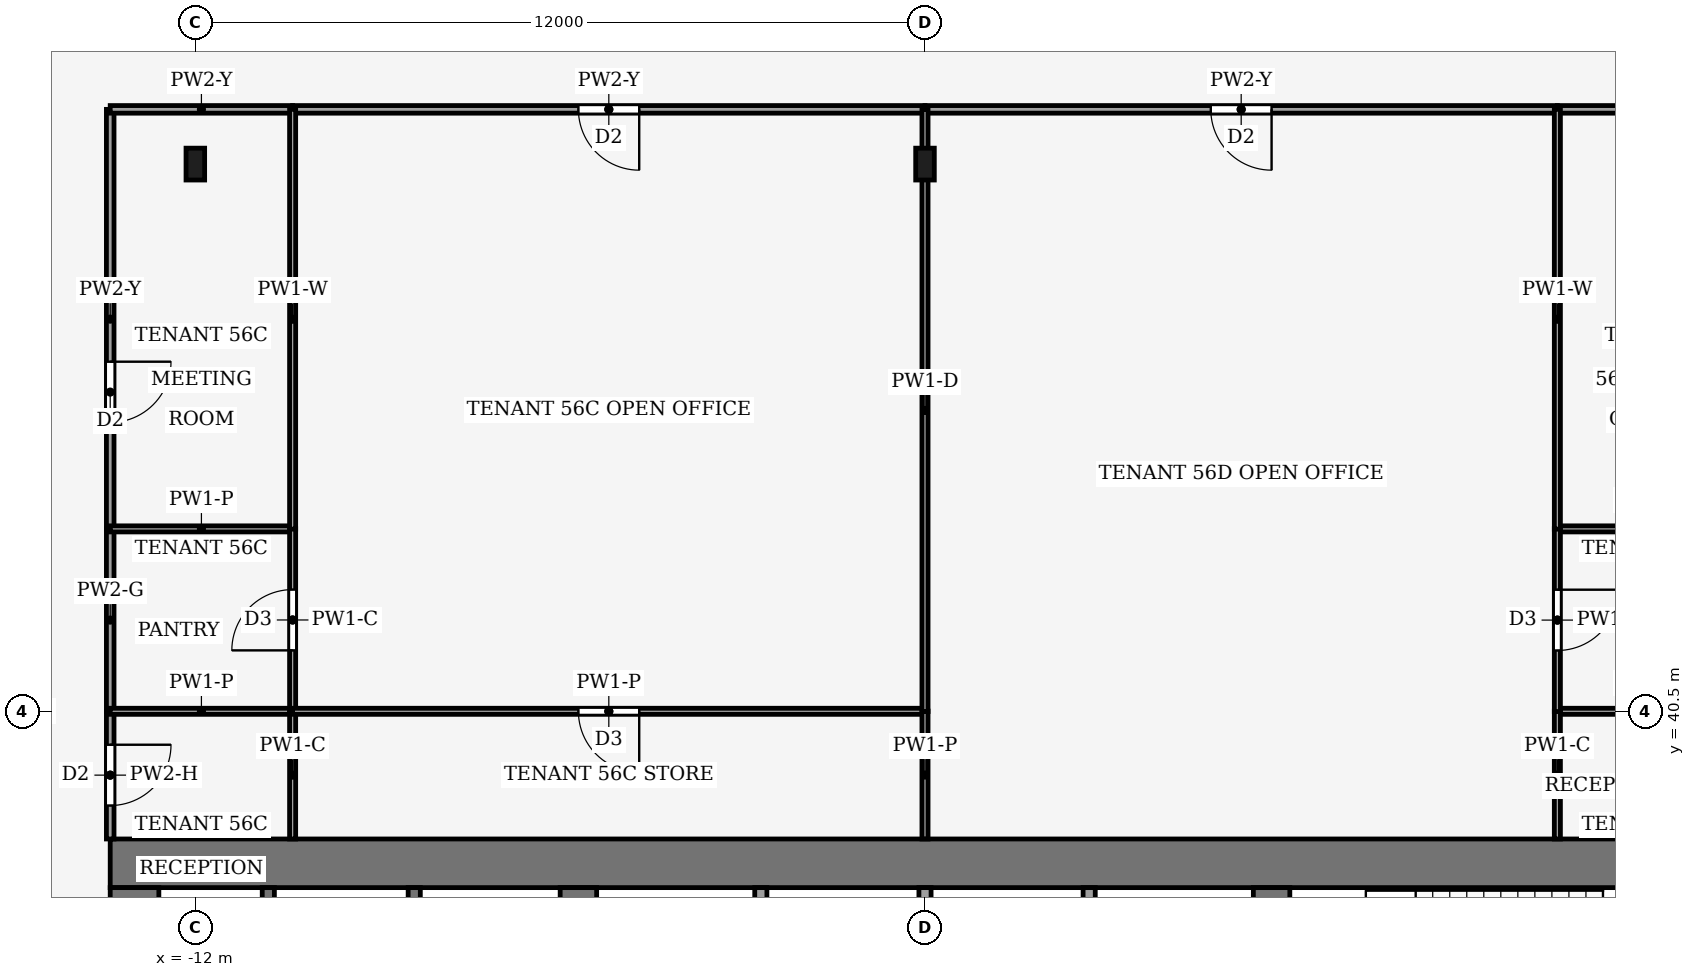
"""IFC4 building model, lengths in metres.
Left out: names, types, materials, properties, quantities, classifications, styles, units other than length and angle.
Written with IfcOpenShell. Run it as: python <this file> out.ifc"""

import sys

from ifc_helpers import new_model, si_unit, direction, frame, frame_2d, origin, origin_2d, place, context, subcontext, project, spatial, rectangle, i_section, extrude, element, fill, save


model = new_model("IFC4")
c1 = context("Model", 3, precision=1e-05, world=origin(), true_north=direction((0.0, 1.0)))
c2 = subcontext(c1, "Body", "Model", "MODEL_VIEW")
j1 = project(units=[si_unit("LENGTHUNIT", "METRE"), si_unit("PLANEANGLEUNIT", "RADIAN")], contexts=[c1])
p1 = place(None, origin())
s1 = spatial("IfcSite", under=j1, at=p1, CompositionType="ELEMENT")
p2 = place(p1, origin())
s2 = spatial("IfcBuilding", under=s1, at=p2, CompositionType="ELEMENT")
p3 = place(p2, frame((0.0, 0.0, 246.0)))
s3 = spatial("IfcBuildingStorey", under=s2, at=p3, CompositionType="ELEMENT", Elevation=246.0)
p4 = place(p3, frame((-13.4, 38.0, -0.13), z_axis=(0.0, 0.0, 1.0), x_axis=(1.0, 0.0, 0.0)))
e1 = element("IfcWall", 1, at=p4, inside=s3, PredefinedType="SHEAR", context=c2, shape_type="SweptSolid", body=[
    extrude(rectangle(XDim=26.8, YDim=0.8, at=frame_2d((13.4, 0.0))), origin(), (0.0, 0.0, 1.0), 4.0),
])
p5 = place(p3, frame((-13.0, 18.4, -0.13), z_axis=(0.0, 0.0, 1.0), x_axis=(0.0, 1.0, 0.0)))
e2 = element("IfcWall", 2, at=p5, inside=s3, PredefinedType="SHEAR", context=c2, shape_type="SweptSolid", body=[
    extrude(rectangle(XDim=19.2, YDim=0.8, at=frame_2d((9.6, 0.0))), origin(), (0.0, 0.0, 1.0), 4.0),
])
p6 = place(p5, frame((2.8, 0.0, 0.13)))
e3 = element("IfcOpeningElement", 3, at=p6, cuts=e2, PredefinedType="OPENING", context=c2, shape_type="SweptSolid", body=[
    extrude(rectangle(XDim=2.4, YDim=2.4, at=frame_2d((1.2, 1.2))), frame((0.0, 0.41, 0.0), z_axis=(0.0, -1.0, 0.0), x_axis=(1.0, 0.0, 0.0)), (0.0, 0.0, 1.0), 0.82),
])
p7 = place(p5, frame((13.4, 0.0, 0.13)))
e4 = element("IfcOpeningElement", 4, at=p7, cuts=e2, PredefinedType="OPENING", context=c2, shape_type="SweptSolid", body=[
    extrude(rectangle(XDim=1.4, YDim=2.2, at=frame_2d((0.7, 1.1))), frame((0.0, 0.41, 0.0), z_axis=(0.0, -1.0, 0.0), x_axis=(1.0, 0.0, 0.0)), (0.0, 0.0, 1.0), 0.82),
])
p8 = place(p3, frame((-5.7, 18.4, -0.13), z_axis=(0.0, 0.0, 1.0), x_axis=(0.0, 1.0, 0.0)))
e5 = element("IfcWall", 5, at=p8, inside=s3, PredefinedType="SHEAR", context=c2, shape_type="SweptSolid", body=[
    extrude(rectangle(XDim=19.2, YDim=0.6, at=frame_2d((9.6, 0.0))), origin(), (0.0, 0.0, 1.0), 4.0),
])
p9 = place(p8, frame((8.35, 0.0, 0.13)))
e6 = element("IfcOpeningElement", 6, at=p9, cuts=e5, PredefinedType="OPENING", context=c2, shape_type="SweptSolid", body=[
    extrude(rectangle(XDim=0.9, YDim=2.1, at=frame_2d((0.45, 1.05))), frame((0.0, 0.31, 0.0), z_axis=(0.0, -1.0, 0.0), x_axis=(1.0, 0.0, 0.0)), (0.0, 0.0, 1.0), 0.62),
])
p10 = place(p3, frame((5.7, 18.4, -0.13), z_axis=(0.0, 0.0, 1.0), x_axis=(0.0, 1.0, 0.0)))
e7 = element("IfcWall", 7, at=p10, inside=s3, PredefinedType="SHEAR", context=c2, shape_type="SweptSolid", body=[
    extrude(rectangle(XDim=19.2, YDim=0.6, at=frame_2d((9.6, 0.0))), origin(), (0.0, 0.0, 1.0), 4.0),
])
p11 = place(p10, frame((8.35, 0.0, 0.13)))
e8 = element("IfcOpeningElement", 8, at=p11, cuts=e7, PredefinedType="OPENING", context=c2, shape_type="SweptSolid", body=[
    extrude(rectangle(XDim=0.9, YDim=2.1, at=frame_2d((0.45, 1.05))), frame((0.0, 0.31, 0.0), z_axis=(0.0, -1.0, 0.0), x_axis=(1.0, 0.0, 0.0)), (0.0, 0.0, 1.0), 0.62),
])
p12 = place(p10, frame((13.3, 0.0, 0.13)))
e9 = element("IfcOpeningElement", 9, at=p12, cuts=e7, PredefinedType="OPENING", context=c2, shape_type="SweptSolid", body=[
    extrude(rectangle(XDim=2.4, YDim=2.4, at=frame_2d((1.2, 1.2))), frame((0.0, 0.31, 0.0), z_axis=(0.0, -1.0, 0.0), x_axis=(1.0, 0.0, 0.0)), (0.0, 0.0, 1.0), 0.62),
])
for number, where, z_axis, x_axis in (
    (10, (-12.0, 49.5, 0.0), (0.0, 0.0, 1.0), (1.0, 0.0, 0.0)),
    (11, (0.0, 49.5, 0.0), (0.0, 0.0, 1.0), (1.0, 0.0, 0.0)),
):
    element("IfcColumn", number, at=place(p3, frame(where, z_axis=z_axis, x_axis=x_axis)), inside=s3, PredefinedType="COLUMN", context=c2, shape_type="SweptSolid", body=[
        extrude(i_section(OverallWidth=0.306, OverallDepth=0.524, WebThickness=0.012, FlangeThickness=0.04, FilletRadius=0.027, at=origin_2d()), origin(), (0.0, 0.0, 1.0), 4.0),
    ])
for number, where, z_axis, x_axis in (
    (12, (-10.8, 34.0, 0.0), (0.0, 0.0, 1.0), (0.0, 1.0, 0.0)),
    (13, (-8.4, 34.0, 0.0), (0.0, 0.0, 1.0), (0.0, 1.0, 0.0)),
    (14, (-2.7, 34.0, 0.0), (0.0, 0.0, 1.0), (0.0, 1.0, 0.0)),
    (15, (0.0, 34.0, 0.0), (0.0, 0.0, 1.0), (0.0, 1.0, 0.0)),
    (16, (2.7, 34.0, 0.0), (0.0, 0.0, 1.0), (0.0, 1.0, 0.0)),
):
    element("IfcWall", number, at=place(p3, frame(where, z_axis=z_axis, x_axis=x_axis)), inside=s3, PredefinedType="PARTITIONING", context=c2, shape_type="SweptSolid", body=[
        extrude(rectangle(XDim=3.6, YDim=0.2, at=frame_2d((1.8, 0.0))), origin(), (0.0, 0.0, 1.0), 3.87),
    ])
p13 = place(p3, frame((-13.4, 40.5, 0.0), z_axis=(0.0, 0.0, 1.0), x_axis=(0.0, -1.0, 0.0)))
e17 = element("IfcWall", 17, at=p13, inside=s3, PredefinedType="PARTITIONING", context=c2, shape_type="SweptSolid", body=[
    extrude(rectangle(XDim=2.1, YDim=0.125, at=frame_2d((1.05, 0.0))), origin(), (0.0, 0.0, 1.0), 3.14),
])
p14 = place(p13, frame((0.55, 0.0, 0.0)))
e18 = element("IfcOpeningElement", 18, at=p14, cuts=e17, PredefinedType="OPENING", context=c2, shape_type="SweptSolid", body=[
    extrude(rectangle(XDim=1.0, YDim=2.1, at=frame_2d((0.5, 1.05))), frame((0.0, 0.073, 0.0), z_axis=(0.0, -1.0, 0.0), x_axis=(1.0, 0.0, 0.0)), (0.0, 0.0, 1.0), 0.145),
])
p15 = place(p3, frame((-13.4, 40.5, 0.0), z_axis=(0.0, 0.0, 1.0), x_axis=(0.0, 1.0, 0.0)))
e19 = element("IfcWall", 19, at=p15, inside=s3, PredefinedType="PARTITIONING", context=c2, shape_type="SweptSolid", body=[
    extrude(rectangle(XDim=3.0, YDim=0.125, at=frame_2d((1.5, 0.0))), origin(), (0.0, 0.0, 1.0), 3.87),
])
p16 = place(p3, frame((-13.4, 50.4, 0.0), z_axis=(0.0, 0.0, 1.0), x_axis=(0.0, -1.0, 0.0)))
e20 = element("IfcWall", 20, at=p16, inside=s3, PredefinedType="PARTITIONING", context=c2, shape_type="SweptSolid", body=[
    extrude(rectangle(XDim=6.9, YDim=0.125, at=frame_2d((3.45, 0.0))), origin(), (0.0, 0.0, 1.0), 3.24),
])
p17 = place(p16, frame((4.15, 0.0, 0.0)))
e21 = element("IfcOpeningElement", 21, at=p17, cuts=e20, PredefinedType="OPENING", context=c2, shape_type="SweptSolid", body=[
    extrude(rectangle(XDim=1.0, YDim=2.1, at=frame_2d((0.5, 1.05))), frame((0.0, 0.073, 0.0), z_axis=(0.0, -1.0, 0.0), x_axis=(1.0, 0.0, 0.0)), (0.0, 0.0, 1.0), 0.145),
])
p18 = place(p3, frame((-10.4, 50.4, 0.0), z_axis=(0.0, 0.0, 1.0), x_axis=(-1.0, 0.0, 0.0)))
e22 = element("IfcWall", 22, at=p18, inside=s3, PredefinedType="PARTITIONING", context=c2, shape_type="SweptSolid", body=[
    extrude(rectangle(XDim=3.0, YDim=0.125, at=frame_2d((1.5, 0.0))), origin(), (0.0, 0.0, 1.0), 3.24),
])
p19 = place(p3, frame((0.0, 50.4, 0.0), z_axis=(0.0, 0.0, 1.0), x_axis=(-1.0, 0.0, 0.0)))
e23 = element("IfcWall", 23, at=p19, inside=s3, PredefinedType="PARTITIONING", context=c2, shape_type="SweptSolid", body=[
    extrude(rectangle(XDim=10.4, YDim=0.125, at=frame_2d((5.2, 0.0))), origin(), (0.0, 0.0, 1.0), 3.24),
])
p20 = place(p19, frame((4.7, 0.0, 0.0)))
e24 = element("IfcOpeningElement", 24, at=p20, cuts=e23, PredefinedType="OPENING", context=c2, shape_type="SweptSolid", body=[
    extrude(rectangle(XDim=1.0, YDim=2.1, at=frame_2d((0.5, 1.05))), frame((0.0, 0.073, 0.0), z_axis=(0.0, -1.0, 0.0), x_axis=(1.0, 0.0, 0.0)), (0.0, 0.0, 1.0), 0.145),
])
p21 = place(p3, frame((13.4, 50.4, 0.0), z_axis=(0.0, 0.0, 1.0), x_axis=(-1.0, 0.0, 0.0)))
e25 = element("IfcWall", 25, at=p21, inside=s3, PredefinedType="PARTITIONING", context=c2, shape_type="SweptSolid", body=[
    extrude(rectangle(XDim=3.0, YDim=0.125, at=frame_2d((1.5, 0.0))), origin(), (0.0, 0.0, 1.0), 3.24),
])
p22 = place(p3, frame((10.4, 50.4, 0.0), z_axis=(0.0, 0.0, 1.0), x_axis=(-1.0, 0.0, 0.0)))
e26 = element("IfcWall", 26, at=p22, inside=s3, PredefinedType="PARTITIONING", context=c2, shape_type="SweptSolid", body=[
    extrude(rectangle(XDim=10.4, YDim=0.125, at=frame_2d((5.2, 0.0))), origin(), (0.0, 0.0, 1.0), 3.24),
])
p23 = place(p22, frame((4.7, 0.0, 0.0)))
e27 = element("IfcOpeningElement", 27, at=p23, cuts=e26, PredefinedType="OPENING", context=c2, shape_type="SweptSolid", body=[
    extrude(rectangle(XDim=1.0, YDim=2.1, at=frame_2d((0.5, 1.05))), frame((0.0, 0.073, 0.0), z_axis=(0.0, -1.0, 0.0), x_axis=(1.0, 0.0, 0.0)), (0.0, 0.0, 1.0), 0.145),
])
p24 = place(p3, frame((-10.4, 40.5, 0.0), z_axis=(0.0, 0.0, 1.0), x_axis=(-1.0, 0.0, 0.0)))
e28 = element("IfcWall", 28, at=p24, inside=s3, PredefinedType="PARTITIONING", context=c2, shape_type="SweptSolid", body=[
    extrude(rectangle(XDim=3.0, YDim=0.1, at=frame_2d((1.5, 0.0))), origin(), (0.0, 0.0, 1.0), 3.44),
])
p25 = place(p3, frame((-10.4, 38.4, 0.0), z_axis=(0.0, 0.0, 1.0), x_axis=(0.0, 1.0, 0.0)))
e29 = element("IfcWall", 29, at=p25, inside=s3, PredefinedType="PARTITIONING", context=c2, shape_type="SweptSolid", body=[
    extrude(rectangle(XDim=2.1, YDim=0.1, at=frame_2d((1.05, 0.0))), origin(), (0.0, 0.0, 1.0), 3.87),
])
p26 = place(p3, frame((-10.4, 43.5, 0.0), z_axis=(0.0, 0.0, 1.0), x_axis=(-1.0, 0.0, 0.0)))
e30 = element("IfcWall", 30, at=p26, inside=s3, PredefinedType="PARTITIONING", context=c2, shape_type="SweptSolid", body=[
    extrude(rectangle(XDim=3.0, YDim=0.1, at=frame_2d((1.5, 0.0))), origin(), (0.0, 0.0, 1.0), 3.44),
])
p27 = place(p3, frame((-10.4, 40.5, 0.0), z_axis=(0.0, 0.0, 1.0), x_axis=(0.0, 1.0, 0.0)))
e31 = element("IfcWall", 31, at=p27, inside=s3, PredefinedType="PARTITIONING", context=c2, shape_type="SweptSolid", body=[
    extrude(rectangle(XDim=3.004, YDim=0.1, at=frame_2d((1.502, 0.0))), origin(), (0.0, 0.0, 1.0), 3.87),
])
p28 = place(p27, frame((1.002, 0.0, 0.0)))
e32 = element("IfcOpeningElement", 32, at=p28, cuts=e31, PredefinedType="OPENING", context=c2, shape_type="SweptSolid", body=[
    extrude(rectangle(XDim=1.0, YDim=2.1, at=frame_2d((0.5, 1.05))), frame((0.0, 0.06, 0.0), z_axis=(0.0, -1.0, 0.0), x_axis=(1.0, 0.0, 0.0)), (0.0, 0.0, 1.0), 0.12),
])
p29 = place(p3, frame((-10.4, 43.496, 0.0), z_axis=(0.0, 0.0, 1.0), x_axis=(0.0, 1.0, 0.0)))
e33 = element("IfcWall", 33, at=p29, inside=s3, PredefinedType="PARTITIONING", context=c2, shape_type="SweptSolid", body=[
    extrude(rectangle(XDim=6.904, YDim=0.1, at=frame_2d((3.452, 0.0))), origin(), (0.0, 0.0, 1.0), 3.24),
])
p30 = place(p3, frame((0.0, 40.5, 0.0), z_axis=(0.0, 0.0, 1.0), x_axis=(-1.0, 0.0, 0.0)))
e34 = element("IfcWall", 34, at=p30, inside=s3, PredefinedType="PARTITIONING", context=c2, shape_type="SweptSolid", body=[
    extrude(rectangle(XDim=10.4, YDim=0.1, at=frame_2d((5.2, 0.0))), origin(), (0.0, 0.0, 1.0), 3.44),
])
p31 = place(p30, frame((4.7, 0.0, 0.0)))
e35 = element("IfcOpeningElement", 35, at=p31, cuts=e34, PredefinedType="OPENING", context=c2, shape_type="SweptSolid", body=[
    extrude(rectangle(XDim=1.0, YDim=2.1, at=frame_2d((0.5, 1.05))), frame((0.0, 0.06, 0.0), z_axis=(0.0, -1.0, 0.0), x_axis=(1.0, 0.0, 0.0)), (0.0, 0.0, 1.0), 0.12),
])
p32 = place(p3, frame((0.0, 38.4, 0.0), z_axis=(0.0, 0.0, 1.0), x_axis=(0.0, 1.0, 0.0)))
e36 = element("IfcWall", 36, at=p32, inside=s3, PredefinedType="PARTITIONING", context=c2, shape_type="SweptSolid", body=[
    extrude(rectangle(XDim=2.104, YDim=0.1, at=frame_2d((1.052, 0.0))), origin(), (0.0, 0.0, 1.0), 3.44),
])
p33 = place(p3, frame((0.0, 40.496, 0.0), z_axis=(0.0, 0.0, 1.0), x_axis=(0.0, 1.0, 0.0)))
e37 = element("IfcWall", 37, at=p33, inside=s3, PredefinedType="PARTITIONING", context=c2, shape_type="SweptSolid", body=[
    extrude(rectangle(XDim=9.904, YDim=0.1, at=frame_2d((4.952, 0.0))), origin(), (0.0, 0.0, 1.0), 3.29),
])
p34 = place(p3, frame((13.4, 40.5, 0.0), z_axis=(0.0, 0.0, 1.0), x_axis=(-1.0, 0.0, 0.0)))
e38 = element("IfcWall", 38, at=p34, inside=s3, PredefinedType="PARTITIONING", context=c2, shape_type="SweptSolid", body=[
    extrude(rectangle(XDim=3.0, YDim=0.1, at=frame_2d((1.5, 0.0))), origin(), (0.0, 0.0, 1.0), 3.44),
])
p35 = place(p3, frame((10.4, 40.504, 0.0), z_axis=(0.0, 0.0, 1.0), x_axis=(0.0, -1.0, 0.0)))
e39 = element("IfcWall", 39, at=p35, inside=s3, PredefinedType="PARTITIONING", context=c2, shape_type="SweptSolid", body=[
    extrude(rectangle(XDim=2.104, YDim=0.1, at=frame_2d((1.052, 0.0))), origin(), (0.0, 0.0, 1.0), 3.87),
])
p36 = place(p3, frame((13.4, 43.5, 0.0), z_axis=(0.0, 0.0, 1.0), x_axis=(-1.0, 0.0, 0.0)))
e40 = element("IfcWall", 40, at=p36, inside=s3, PredefinedType="PARTITIONING", context=c2, shape_type="SweptSolid", body=[
    extrude(rectangle(XDim=3.0, YDim=0.1, at=frame_2d((1.5, 0.0))), origin(), (0.0, 0.0, 1.0), 3.44),
])
p37 = place(p3, frame((10.4, 43.504, 0.0), z_axis=(0.0, 0.0, 1.0), x_axis=(0.0, -1.0, 0.0)))
e41 = element("IfcWall", 41, at=p37, inside=s3, PredefinedType="PARTITIONING", context=c2, shape_type="SweptSolid", body=[
    extrude(rectangle(XDim=3.008, YDim=0.1, at=frame_2d((1.504, 0.0))), origin(), (0.0, 0.0, 1.0), 3.87),
])
p38 = place(p37, frame((1.004, 0.0, 0.0)))
e42 = element("IfcOpeningElement", 42, at=p38, cuts=e41, PredefinedType="OPENING", context=c2, shape_type="SweptSolid", body=[
    extrude(rectangle(XDim=1.0, YDim=2.1, at=frame_2d((0.5, 1.05))), frame((0.0, 0.06, 0.0), z_axis=(0.0, -1.0, 0.0), x_axis=(1.0, 0.0, 0.0)), (0.0, 0.0, 1.0), 0.12),
])
p39 = place(p3, frame((10.4, 50.4, 0.0), z_axis=(0.0, 0.0, 1.0), x_axis=(0.0, -1.0, 0.0)))
e43 = element("IfcWall", 43, at=p39, inside=s3, PredefinedType="PARTITIONING", context=c2, shape_type="SweptSolid", body=[
    extrude(rectangle(XDim=6.904, YDim=0.1, at=frame_2d((3.452, 0.0))), origin(), (0.0, 0.0, 1.0), 3.24),
])
p40 = place(p14, origin())
e44 = element("IfcDoor", 44, at=p40, inside=s3, OperationType="SINGLE_SWING_LEFT", PredefinedType="DOOR", context=c2, shape_type="SweptSolid", body=[
    extrude(rectangle(XDim=1.0, YDim=2.1, at=frame_2d((0.5, 1.05))), frame((0.0, 0.025, 0.0), z_axis=(0.0, -1.0, 0.0), x_axis=(1.0, 0.0, 0.0)), (0.0, 0.0, 1.0), 0.05),
])
fill(e18, e44)
p41 = place(p17, origin())
e45 = element("IfcDoor", 45, at=p41, inside=s3, OperationType="SINGLE_SWING_RIGHT", PredefinedType="DOOR", context=c2, shape_type="SweptSolid", body=[
    extrude(rectangle(XDim=1.0, YDim=2.1, at=frame_2d((0.5, 1.05))), frame((0.0, 0.025, 0.0), z_axis=(0.0, -1.0, 0.0), x_axis=(1.0, 0.0, 0.0)), (0.0, 0.0, 1.0), 0.05),
])
fill(e21, e45)
p42 = place(p20, origin())
e46 = element("IfcDoor", 46, at=p42, inside=s3, OperationType="SINGLE_SWING_LEFT", PredefinedType="DOOR", context=c2, shape_type="SweptSolid", body=[
    extrude(rectangle(XDim=1.0, YDim=2.1, at=frame_2d((0.5, 1.05))), frame((0.0, 0.025, 0.0), z_axis=(0.0, -1.0, 0.0), x_axis=(1.0, 0.0, 0.0)), (0.0, 0.0, 1.0), 0.05),
])
fill(e24, e46)
p43 = place(p23, origin())
e47 = element("IfcDoor", 47, at=p43, inside=s3, OperationType="SINGLE_SWING_RIGHT", PredefinedType="DOOR", context=c2, shape_type="SweptSolid", body=[
    extrude(rectangle(XDim=1.0, YDim=2.1, at=frame_2d((0.5, 1.05))), frame((0.0, 0.025, 0.0), z_axis=(0.0, -1.0, 0.0), x_axis=(1.0, 0.0, 0.0)), (0.0, 0.0, 1.0), 0.05),
])
fill(e27, e47)
p44 = place(p28, origin())
e48 = element("IfcDoor", 48, at=p44, inside=s3, OperationType="SINGLE_SWING_LEFT", PredefinedType="DOOR", context=c2, shape_type="SweptSolid", body=[
    extrude(rectangle(XDim=1.0, YDim=2.1, at=frame_2d((0.5, 1.05))), frame((0.0, 0.025, 0.0), z_axis=(0.0, -1.0, 0.0), x_axis=(1.0, 0.0, 0.0)), (0.0, 0.0, 1.0), 0.05),
])
fill(e32, e48)
p45 = place(p31, origin())
e49 = element("IfcDoor", 49, at=p45, inside=s3, OperationType="SINGLE_SWING_RIGHT", PredefinedType="DOOR", context=c2, shape_type="SweptSolid", body=[
    extrude(rectangle(XDim=1.0, YDim=2.1, at=frame_2d((0.5, 1.05))), frame((0.0, 0.025, 0.0), z_axis=(0.0, -1.0, 0.0), x_axis=(1.0, 0.0, 0.0)), (0.0, 0.0, 1.0), 0.05),
])
fill(e35, e49)
p46 = place(p38, origin())
e50 = element("IfcDoor", 50, at=p46, inside=s3, OperationType="SINGLE_SWING_LEFT", PredefinedType="DOOR", context=c2, shape_type="SweptSolid", body=[
    extrude(rectangle(XDim=1.0, YDim=2.1, at=frame_2d((0.5, 1.05))), frame((0.0, 0.025, 0.0), z_axis=(0.0, -1.0, 0.0), x_axis=(1.0, 0.0, 0.0)), (0.0, 0.0, 1.0), 0.05),
])
fill(e42, e50)
save(model, sys.argv[1])
